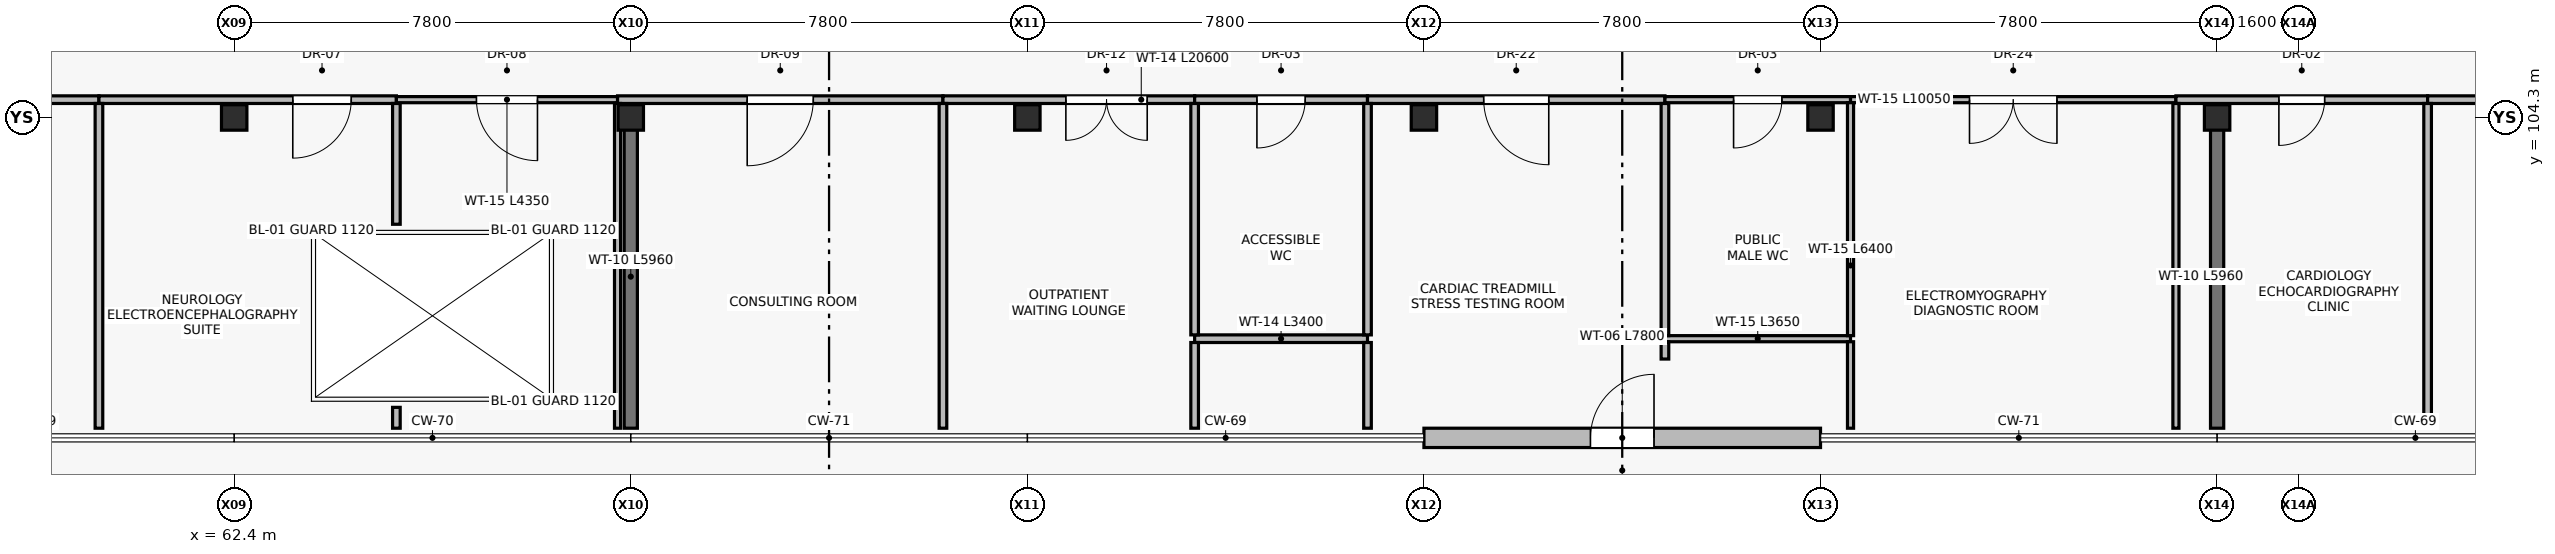
"""IFC4 building model, lengths in metres.
Left out: names, types, materials, properties, quantities, classifications, styles, units other than length and angle.
Written with IfcOpenShell. Run it as: python <this file> out.ifc"""

import sys

from ifc_helpers import new_model, si_unit, direction, frame, frame_2d, origin, origin_2d, place, context, subcontext, project, spatial, rectangle, extrude, element, fill, save


model = new_model("IFC4")
c1 = context("Model", 3, precision=1e-05, world=origin(), true_north=direction((0.0, 1.0)))
c2 = subcontext(c1, "Body", "Model", "MODEL_VIEW")
j1 = project(units=[si_unit("LENGTHUNIT", "METRE"), si_unit("PLANEANGLEUNIT", "RADIAN")], contexts=[c1])
p1 = place(None, origin())
s1 = spatial("IfcSite", under=j1, at=p1, CompositionType="ELEMENT")
p2 = place(p1, origin())
s2 = spatial("IfcBuilding", under=s1, at=p2, CompositionType="ELEMENT")
p3 = place(p2, frame((0.0, 0.0, 14.1)))
s3 = spatial("IfcBuildingStorey", under=s2, at=p3, CompositionType="ELEMENT", Elevation=14.1)
for number, where, z_axis, x_axis in (
    (1, (62.4, 104.3, 0.0), (0.0, 0.0, 1.0), (1.0, 0.0, 0.0)),
    (2, (70.2, 104.3, 0.0), (0.0, 0.0, 1.0), (1.0, 0.0, 0.0)),
    (3, (78.0, 104.3, 0.0), (0.0, 0.0, 1.0), (1.0, 0.0, 0.0)),
    (4, (85.8, 104.3, 0.0), (0.0, 0.0, 1.0), (1.0, 0.0, 0.0)),
    (5, (93.6, 104.3, 0.0), (0.0, 0.0, 1.0), (1.0, 0.0, 0.0)),
    (6, (101.4, 104.3, 0.0), (0.0, 0.0, 1.0), (1.0, 0.0, 0.0)),
):
    element("IfcColumn", number, at=place(p3, frame(where, z_axis=z_axis, x_axis=x_axis)), inside=s3, PredefinedType="COLUMN", context=c2, shape_type="SweptSolid", body=[
        extrude(rectangle(XDim=0.5, YDim=0.5, at=origin_2d()), origin(), (0.0, 0.0, 1.0), 4.5),
    ])
p4 = place(p3, frame((93.6, 98.0, 0.0), z_axis=(0.0, 0.0, 1.0), x_axis=(-1.0, 0.0, 0.0)))
e7 = element("IfcWall", 7, at=p4, inside=s3, PredefinedType="STANDARD", context=c2, shape_type="SweptSolid", body=[
    extrude(rectangle(XDim=7.8, YDim=0.38, at=frame_2d((3.9, 0.0))), origin(), (0.0, 0.0, 1.0), 4.26),
])
p5 = place(p4, frame((3.275, 0.0, 0.0)))
e8 = element("IfcOpeningElement", 8, at=p5, cuts=e7, PredefinedType="OPENING", context=c2, shape_type="SweptSolid", body=[
    extrude(rectangle(XDim=1.25, YDim=2.2, at=frame_2d((0.625, 1.1))), frame((0.0, 0.2, 0.0), z_axis=(0.0, -1.0, 0.0), x_axis=(1.0, 0.0, 0.0)), (0.0, 0.0, 1.0), 0.4),
])
for number, where, z_axis, x_axis in (
    (9, (70.2, 98.19, 0.0), (0.0, 0.0, 1.0), (0.0, 1.0, 0.0)),
    (10, (101.4, 98.19, 0.0), (0.0, 0.0, 1.0), (0.0, 1.0, 0.0)),
):
    element("IfcWall", number, at=place(p3, frame(where, z_axis=z_axis, x_axis=x_axis)), inside=s3, PredefinedType="SHEAR", context=c2, shape_type="SweptSolid", body=[
        extrude(rectangle(XDim=5.96, YDim=0.26, at=frame_2d((2.98, 0.0))), origin(), (0.0, 0.0, 1.0), 4.26),
    ])
p6 = place(p3, frame((59.74, 104.65, 0.0), z_axis=(0.0, 0.0, 1.0), x_axis=(-1.0, 0.0, 0.0)))
e11 = element("IfcWall", 11, at=p6, inside=s3, PredefinedType="PARTITIONING", context=c2, shape_type="SweptSolid", body=[
    extrude(rectangle(XDim=7.8, YDim=0.15, at=frame_2d((3.9, 0.0))), origin(), (0.0, 0.0, 1.0), 3.72),
])
p7 = place(p6, frame((3.35, 0.0, 0.0)))
e12 = element("IfcOpeningElement", 12, at=p7, cuts=e11, PredefinedType="OPENING", context=c2, shape_type="SweptSolid", body=[
    extrude(rectangle(XDim=1.1, YDim=2.15, at=frame_2d((0.55, 1.075))), frame((0.0, 0.085, 0.0), z_axis=(0.0, -1.0, 0.0), x_axis=(1.0, 0.0, 0.0)), (0.0, 0.0, 1.0), 0.17),
])
p8 = place(p3, frame((65.59, 104.65, 0.0), z_axis=(0.0, 0.0, 1.0), x_axis=(-1.0, 0.0, 0.0)))
e13 = element("IfcWall", 13, at=p8, inside=s3, PredefinedType="PARTITIONING", context=c2, shape_type="SweptSolid", body=[
    extrude(rectangle(XDim=5.85, YDim=0.15, at=frame_2d((2.925, 0.0))), origin(), (0.0, 0.0, 1.0), 3.72),
])
p9 = place(p8, frame((0.887, 0.0, 0.0)))
e14 = element("IfcOpeningElement", 14, at=p9, cuts=e13, PredefinedType="OPENING", context=c2, shape_type="SweptSolid", body=[
    extrude(rectangle(XDim=1.15, YDim=2.2, at=frame_2d((0.575, 1.1))), frame((0.0, 0.085, 0.0), z_axis=(0.0, -1.0, 0.0), x_axis=(1.0, 0.0, 0.0)), (0.0, 0.0, 1.0), 0.17),
])
p10 = place(p3, frame((69.94, 104.65, 0.0), z_axis=(0.0, 0.0, 1.0), x_axis=(-1.0, 0.0, 0.0)))
e15 = element("IfcWall", 15, at=p10, inside=s3, PredefinedType="PARTITIONING", context=c2, shape_type="SweptSolid", body=[
    extrude(rectangle(XDim=4.35, YDim=0.12, at=frame_2d((2.175, 0.0))), origin(), (0.0, 0.0, 1.0), 3.72),
])
p11 = place(p10, frame((1.575, 0.0, 0.0)))
e16 = element("IfcOpeningElement", 16, at=p11, cuts=e15, PredefinedType="OPENING", context=c2, shape_type="SweptSolid", body=[
    extrude(rectangle(XDim=1.2, YDim=2.2, at=frame_2d((0.6, 1.1))), frame((0.0, 0.07, 0.0), z_axis=(0.0, -1.0, 0.0), x_axis=(1.0, 0.0, 0.0)), (0.0, 0.0, 1.0), 0.14),
])
p12 = place(p3, frame((76.34, 104.65, 0.0), z_axis=(0.0, 0.0, 1.0), x_axis=(-1.0, 0.0, 0.0)))
e17 = element("IfcWall", 17, at=p12, inside=s3, PredefinedType="PARTITIONING", context=c2, shape_type="SweptSolid", body=[
    extrude(rectangle(XDim=6.4, YDim=0.15, at=frame_2d((3.2, 0.0))), origin(), (0.0, 0.0, 1.0), 3.72),
])
p13 = place(p12, frame((2.55, 0.0, 0.0)))
e18 = element("IfcOpeningElement", 18, at=p13, cuts=e17, PredefinedType="OPENING", context=c2, shape_type="SweptSolid", body=[
    extrude(rectangle(XDim=1.3, YDim=2.2, at=frame_2d((0.65, 1.1))), frame((0.0, 0.085, 0.0), z_axis=(0.0, -1.0, 0.0), x_axis=(1.0, 0.0, 0.0)), (0.0, 0.0, 1.0), 0.17),
])
p14 = place(p3, frame((81.29, 104.65, 0.0), z_axis=(0.0, 0.0, 1.0), x_axis=(-1.0, 0.0, 0.0)))
e19 = element("IfcWall", 19, at=p14, inside=s3, PredefinedType="PARTITIONING", context=c2, shape_type="SweptSolid", body=[
    extrude(rectangle(XDim=4.95, YDim=0.15, at=frame_2d((2.475, 0.0))), origin(), (0.0, 0.0, 1.0), 3.72),
])
p15 = place(p14, frame((0.933, 0.0, 0.0)))
e20 = element("IfcOpeningElement", 20, at=p15, cuts=e19, PredefinedType="OPENING", context=c2, shape_type="SweptSolid", body=[
    extrude(rectangle(XDim=1.6, YDim=2.2, at=frame_2d((0.8, 1.1))), frame((0.0, 0.085, 0.0), z_axis=(0.0, -1.0, 0.0), x_axis=(1.0, 0.0, 0.0)), (0.0, 0.0, 1.0), 0.17),
])
p16 = place(p3, frame((84.69, 104.65, 0.0), z_axis=(0.0, 0.0, 1.0), x_axis=(-1.0, 0.0, 0.0)))
e21 = element("IfcWall", 21, at=p16, inside=s3, PredefinedType="PARTITIONING", context=c2, shape_type="SweptSolid", body=[
    extrude(rectangle(XDim=3.4, YDim=0.15, at=frame_2d((1.7, 0.0))), origin(), (0.0, 0.0, 1.0), 3.72),
])
p17 = place(p16, frame((1.225, 0.0, 0.0)))
e22 = element("IfcOpeningElement", 22, at=p17, cuts=e21, PredefinedType="OPENING", context=c2, shape_type="SweptSolid", body=[
    extrude(rectangle(XDim=0.95, YDim=2.1, at=frame_2d((0.475, 1.05))), frame((0.0, 0.085, 0.0), z_axis=(0.0, -1.0, 0.0), x_axis=(1.0, 0.0, 0.0)), (0.0, 0.0, 1.0), 0.17),
])
p18 = place(p3, frame((81.29, 99.95, 0.0), z_axis=(0.0, 0.0, 1.0), x_axis=(1.0, 0.0, 0.0)))
e23 = element("IfcWall", 23, at=p18, inside=s3, PredefinedType="PARTITIONING", context=c2, shape_type="SweptSolid", body=[
    extrude(rectangle(XDim=3.4, YDim=0.15, at=frame_2d((1.7, 0.0))), origin(), (0.0, 0.0, 1.0), 4.26),
])
p19 = place(p3, frame((90.54, 104.65, 0.0), z_axis=(0.0, 0.0, 1.0), x_axis=(-1.0, 0.0, 0.0)))
e24 = element("IfcWall", 24, at=p19, inside=s3, PredefinedType="PARTITIONING", context=c2, shape_type="SweptSolid", body=[
    extrude(rectangle(XDim=5.85, YDim=0.15, at=frame_2d((2.925, 0.0))), origin(), (0.0, 0.0, 1.0), 3.72),
])
p20 = place(p19, frame((2.285, 0.0, 0.0)))
e25 = element("IfcOpeningElement", 25, at=p20, cuts=e24, PredefinedType="OPENING", context=c2, shape_type="SweptSolid", body=[
    extrude(rectangle(XDim=1.28, YDim=2.25, at=frame_2d((0.64, 1.125))), frame((0.0, 0.085, 0.0), z_axis=(0.0, -1.0, 0.0), x_axis=(1.0, 0.0, 0.0)), (0.0, 0.0, 1.0), 0.17),
])
p21 = place(p3, frame((94.19, 104.65, 0.0), z_axis=(0.0, 0.0, 1.0), x_axis=(-1.0, 0.0, 0.0)))
e26 = element("IfcWall", 26, at=p21, inside=s3, PredefinedType="PARTITIONING", context=c2, shape_type="SweptSolid", body=[
    extrude(rectangle(XDim=3.65, YDim=0.12, at=frame_2d((1.825, 0.0))), origin(), (0.0, 0.0, 1.0), 3.72),
])
p22 = place(p21, frame((1.35, 0.0, 0.0)))
e27 = element("IfcOpeningElement", 27, at=p22, cuts=e26, PredefinedType="OPENING", context=c2, shape_type="SweptSolid", body=[
    extrude(rectangle(XDim=0.95, YDim=2.1, at=frame_2d((0.475, 1.05))), frame((0.0, 0.07, 0.0), z_axis=(0.0, -1.0, 0.0), x_axis=(1.0, 0.0, 0.0)), (0.0, 0.0, 1.0), 0.14),
])
p23 = place(p3, frame((90.54, 99.95, 0.0), z_axis=(0.0, 0.0, 1.0), x_axis=(1.0, 0.0, 0.0)))
e28 = element("IfcWall", 28, at=p23, inside=s3, PredefinedType="PARTITIONING", context=c2, shape_type="SweptSolid", body=[
    extrude(rectangle(XDim=3.65, YDim=0.12, at=frame_2d((1.825, 0.0))), origin(), (0.0, 0.0, 1.0), 4.26),
])
p24 = place(p3, frame((100.59, 104.65, 0.0), z_axis=(0.0, 0.0, 1.0), x_axis=(-1.0, 0.0, 0.0)))
e29 = element("IfcWall", 29, at=p24, inside=s3, PredefinedType="PARTITIONING", context=c2, shape_type="SweptSolid", body=[
    extrude(rectangle(XDim=6.4, YDim=0.12, at=frame_2d((3.2, 0.0))), origin(), (0.0, 0.0, 1.0), 3.74),
])
p25 = place(p24, frame((2.34, 0.0, 0.0)))
e30 = element("IfcOpeningElement", 30, at=p25, cuts=e29, PredefinedType="OPENING", context=c2, shape_type="SweptSolid", body=[
    extrude(rectangle(XDim=1.72, YDim=2.3, at=frame_2d((0.86, 1.15))), frame((0.0, 0.07, 0.0), z_axis=(0.0, -1.0, 0.0), x_axis=(1.0, 0.0, 0.0)), (0.0, 0.0, 1.0), 0.14),
])
p26 = place(p3, frame((105.54, 104.65, 0.0), z_axis=(0.0, 0.0, 1.0), x_axis=(-1.0, 0.0, 0.0)))
e31 = element("IfcWall", 31, at=p26, inside=s3, PredefinedType="PARTITIONING", context=c2, shape_type="SweptSolid", body=[
    extrude(rectangle(XDim=4.95, YDim=0.15, at=frame_2d((2.475, 0.0))), origin(), (0.0, 0.0, 1.0), 3.74),
])
p27 = place(p26, frame((2.025, 0.0, 0.0)))
e32 = element("IfcOpeningElement", 32, at=p27, cuts=e31, PredefinedType="OPENING", context=c2, shape_type="SweptSolid", body=[
    extrude(rectangle(XDim=0.9, YDim=2.1, at=frame_2d((0.45, 1.05))), frame((0.0, 0.085, 0.0), z_axis=(0.0, -1.0, 0.0), x_axis=(1.0, 0.0, 0.0)), (0.0, 0.0, 1.0), 0.17),
])
p28 = place(p3, frame((113.34, 104.65, 0.0), z_axis=(0.0, 0.0, 1.0), x_axis=(-1.0, 0.0, 0.0)))
e33 = element("IfcWall", 33, at=p28, inside=s3, PredefinedType="PARTITIONING", context=c2, shape_type="SweptSolid", body=[
    extrude(rectangle(XDim=7.8, YDim=0.15, at=frame_2d((3.9, 0.0))), origin(), (0.0, 0.0, 1.0), 3.74),
])
p29 = place(p28, frame((2.23, 0.0, 0.0)))
e34 = element("IfcOpeningElement", 34, at=p29, cuts=e33, PredefinedType="OPENING", context=c2, shape_type="SweptSolid", body=[
    extrude(rectangle(XDim=1.0, YDim=2.1, at=frame_2d((0.5, 1.05))), frame((0.0, 0.085, 0.0), z_axis=(0.0, -1.0, 0.0), x_axis=(1.0, 0.0, 0.0)), (0.0, 0.0, 1.0), 0.17),
])
p30 = place(p3, frame((59.74, 98.19, 0.0), z_axis=(0.0, 0.0, 1.0), x_axis=(0.0, 1.0, 0.0)))
e35 = element("IfcWall", 35, at=p30, inside=s3, PredefinedType="PARTITIONING", context=c2, shape_type="SweptSolid", body=[
    extrude(rectangle(XDim=6.385, YDim=0.15, at=frame_2d((3.192, 0.0))), origin(), (0.0, 0.0, 1.0), 3.95),
])
p31 = place(p3, frame((65.59, 98.19, 0.0), z_axis=(0.0, 0.0, 1.0), x_axis=(0.0, 1.0, 0.0)))
e36 = element("IfcWall", 36, at=p31, inside=s3, PredefinedType="PARTITIONING", context=c2, shape_type="SweptSolid", body=[
    extrude(rectangle(XDim=0.41, YDim=0.15, at=frame_2d((0.205, 0.0))), origin(), (0.0, 0.0, 1.0), 4.26),
])
p32 = place(p3, frame((65.59, 102.2, 0.0), z_axis=(0.0, 0.0, 1.0), x_axis=(0.0, 1.0, 0.0)))
e37 = element("IfcWall", 37, at=p32, inside=s3, PredefinedType="PARTITIONING", context=c2, shape_type="SweptSolid", body=[
    extrude(rectangle(XDim=2.375, YDim=0.15, at=frame_2d((1.188, 0.0))), origin(), (0.0, 0.0, 1.0), 4.26),
])
p33 = place(p3, frame((69.94, 98.19, 0.0), z_axis=(0.0, 0.0, 1.0), x_axis=(0.0, 1.0, 0.0)))
e38 = element("IfcWall", 38, at=p33, inside=s3, PredefinedType="PARTITIONING", context=c2, shape_type="SweptSolid", body=[
    extrude(rectangle(XDim=6.385, YDim=0.12, at=frame_2d((3.192, 0.0))), origin(), (0.0, 0.0, 1.0), 3.77),
])
p34 = place(p3, frame((76.34, 98.19, 0.0), z_axis=(0.0, 0.0, 1.0), x_axis=(0.0, 1.0, 0.0)))
e39 = element("IfcWall", 39, at=p34, inside=s3, PredefinedType="PARTITIONING", context=c2, shape_type="SweptSolid", body=[
    extrude(rectangle(XDim=6.385, YDim=0.15, at=frame_2d((3.192, 0.0))), origin(), (0.0, 0.0, 1.0), 4.26),
])
p35 = place(p3, frame((81.29, 98.19, 0.0), z_axis=(0.0, 0.0, 1.0), x_axis=(0.0, 1.0, 0.0)))
e40 = element("IfcWall", 40, at=p35, inside=s3, PredefinedType="PARTITIONING", context=c2, shape_type="SweptSolid", body=[
    extrude(rectangle(XDim=1.685, YDim=0.15, at=frame_2d((0.843, 0.0))), origin(), (0.0, 0.0, 1.0), 4.26),
])
for number, where, z_axis, x_axis in (
    (41, (81.29, 100.025, 0.0), (0.0, 0.0, 1.0), (0.0, 1.0, 0.0)),
    (42, (84.69, 100.025, 0.0), (0.0, 0.0, 1.0), (0.0, 1.0, 0.0)),
):
    element("IfcWall", number, at=place(p3, frame(where, z_axis=z_axis, x_axis=x_axis)), inside=s3, PredefinedType="PARTITIONING", context=c2, shape_type="SweptSolid", body=[
        extrude(rectangle(XDim=4.55, YDim=0.15, at=frame_2d((2.275, 0.0))), origin(), (0.0, 0.0, 1.0), 4.26),
    ])
p36 = place(p3, frame((84.69, 98.19, 0.0), z_axis=(0.0, 0.0, 1.0), x_axis=(0.0, 1.0, 0.0)))
e43 = element("IfcWall", 43, at=p36, inside=s3, PredefinedType="PARTITIONING", context=c2, shape_type="SweptSolid", body=[
    extrude(rectangle(XDim=1.685, YDim=0.15, at=frame_2d((0.843, 0.0))), origin(), (0.0, 0.0, 1.0), 4.26),
])
p37 = place(p3, frame((90.54, 99.55, 0.0), z_axis=(0.0, 0.0, 1.0), x_axis=(0.0, 1.0, 0.0)))
e44 = element("IfcWall", 44, at=p37, inside=s3, PredefinedType="PARTITIONING", context=c2, shape_type="SweptSolid", body=[
    extrude(rectangle(XDim=0.34, YDim=0.15, at=frame_2d((0.17, 0.0))), origin(), (0.0, 0.0, 1.0), 4.26),
])
p38 = place(p3, frame((90.54, 100.01, 0.0), z_axis=(0.0, 0.0, 1.0), x_axis=(0.0, 1.0, 0.0)))
e45 = element("IfcWall", 45, at=p38, inside=s3, PredefinedType="PARTITIONING", context=c2, shape_type="SweptSolid", body=[
    extrude(rectangle(XDim=4.565, YDim=0.15, at=frame_2d((2.282, 0.0))), origin(), (0.0, 0.0, 1.0), 4.26),
])
p39 = place(p3, frame((94.19, 100.01, 0.0), z_axis=(0.0, 0.0, 1.0), x_axis=(0.0, 1.0, 0.0)))
e46 = element("IfcWall", 46, at=p39, inside=s3, PredefinedType="PARTITIONING", context=c2, shape_type="SweptSolid", body=[
    extrude(rectangle(XDim=4.58, YDim=0.12, at=frame_2d((2.29, 0.0))), origin(), (0.0, 0.0, 1.0), 4.26),
])
p40 = place(p3, frame((94.19, 98.19, 0.0), z_axis=(0.0, 0.0, 1.0), x_axis=(0.0, 1.0, 0.0)))
e47 = element("IfcWall", 47, at=p40, inside=s3, PredefinedType="PARTITIONING", context=c2, shape_type="SweptSolid", body=[
    extrude(rectangle(XDim=1.7, YDim=0.12, at=frame_2d((0.85, 0.0))), origin(), (0.0, 0.0, 1.0), 4.26),
])
p41 = place(p3, frame((100.59, 98.19, 0.0), z_axis=(0.0, 0.0, 1.0), x_axis=(0.0, 1.0, 0.0)))
e48 = element("IfcWall", 48, at=p41, inside=s3, PredefinedType="PARTITIONING", context=c2, shape_type="SweptSolid", body=[
    extrude(rectangle(XDim=6.385, YDim=0.12, at=frame_2d((3.192, 0.0))), origin(), (0.0, 0.0, 1.0), 4.26),
])
p42 = place(p3, frame((105.54, 98.19, 0.0), z_axis=(0.0, 0.0, 1.0), x_axis=(0.0, 1.0, 0.0)))
e49 = element("IfcWall", 49, at=p42, inside=s3, PredefinedType="PARTITIONING", context=c2, shape_type="SweptSolid", body=[
    extrude(rectangle(XDim=6.385, YDim=0.15, at=frame_2d((3.192, 0.0))), origin(), (0.0, 0.0, 1.0), 4.26),
])
p43 = place(p5, frame((1.25, 0.0, 0.0), z_axis=(0.0, 0.0, 1.0), x_axis=(-1.0, 0.0, 0.0)))
e50 = element("IfcDoor", 50, at=p43, inside=s3, OperationType="SINGLE_SWING_LEFT", PredefinedType="DOOR", context=c2, shape_type="SweptSolid", body=[
    extrude(rectangle(XDim=1.25, YDim=2.2, at=frame_2d((0.625, 1.1))), frame((0.0, 0.025, 0.0), z_axis=(0.0, -1.0, 0.0), x_axis=(1.0, 0.0, 0.0)), (0.0, 0.0, 1.0), 0.05),
])
fill(e8, e50)
p44 = place(p9, origin())
e51 = element("IfcDoor", 51, at=p44, inside=s3, OperationType="SINGLE_SWING_RIGHT", PredefinedType="DOOR", context=c2, shape_type="SweptSolid", body=[
    extrude(rectangle(XDim=1.15, YDim=2.2, at=frame_2d((0.575, 1.1))), frame((0.0, 0.025, 0.0), z_axis=(0.0, -1.0, 0.0), x_axis=(1.0, 0.0, 0.0)), (0.0, 0.0, 1.0), 0.05),
])
fill(e14, e51)
p45 = place(p11, origin())
e52 = element("IfcDoor", 52, at=p45, inside=s3, OperationType="SINGLE_SWING_LEFT", PredefinedType="DOOR", context=c2, shape_type="SweptSolid", body=[
    extrude(rectangle(XDim=1.2, YDim=2.2, at=frame_2d((0.6, 1.1))), frame((0.0, 0.025, 0.0), z_axis=(0.0, -1.0, 0.0), x_axis=(1.0, 0.0, 0.0)), (0.0, 0.0, 1.0), 0.05),
])
fill(e16, e52)
p46 = place(p13, origin())
e53 = element("IfcDoor", 53, at=p46, inside=s3, OperationType="SINGLE_SWING_RIGHT", PredefinedType="DOOR", context=c2, shape_type="SweptSolid", body=[
    extrude(rectangle(XDim=1.3, YDim=2.2, at=frame_2d((0.65, 1.1))), frame((0.0, 0.025, 0.0), z_axis=(0.0, -1.0, 0.0), x_axis=(1.0, 0.0, 0.0)), (0.0, 0.0, 1.0), 0.05),
])
fill(e18, e53)
p47 = place(p15, origin())
e54 = element("IfcDoor", 54, at=p47, inside=s3, OperationType="DOUBLE_DOOR_SINGLE_SWING", PredefinedType="DOOR", context=c2, shape_type="SweptSolid", body=[
    extrude(rectangle(XDim=1.6, YDim=2.2, at=frame_2d((0.8, 1.1))), frame((0.0, 0.025, 0.0), z_axis=(0.0, -1.0, 0.0), x_axis=(1.0, 0.0, 0.0)), (0.0, 0.0, 1.0), 0.05),
])
fill(e20, e54)
p48 = place(p17, origin())
e55 = element("IfcDoor", 55, at=p48, inside=s3, OperationType="SINGLE_SWING_RIGHT", PredefinedType="DOOR", context=c2, shape_type="SweptSolid", body=[
    extrude(rectangle(XDim=0.95, YDim=2.1, at=frame_2d((0.475, 1.05))), frame((0.0, 0.025, 0.0), z_axis=(0.0, -1.0, 0.0), x_axis=(1.0, 0.0, 0.0)), (0.0, 0.0, 1.0), 0.05),
])
fill(e22, e55)
p49 = place(p20, origin())
e56 = element("IfcDoor", 56, at=p49, inside=s3, OperationType="SINGLE_SWING_LEFT", PredefinedType="DOOR", context=c2, shape_type="SweptSolid", body=[
    extrude(rectangle(XDim=1.28, YDim=2.25, at=frame_2d((0.64, 1.125))), frame((0.0, 0.025, 0.0), z_axis=(0.0, -1.0, 0.0), x_axis=(1.0, 0.0, 0.0)), (0.0, 0.0, 1.0), 0.05),
])
fill(e25, e56)
p50 = place(p22, origin())
e57 = element("IfcDoor", 57, at=p50, inside=s3, OperationType="SINGLE_SWING_RIGHT", PredefinedType="DOOR", context=c2, shape_type="SweptSolid", body=[
    extrude(rectangle(XDim=0.95, YDim=2.1, at=frame_2d((0.475, 1.05))), frame((0.0, 0.025, 0.0), z_axis=(0.0, -1.0, 0.0), x_axis=(1.0, 0.0, 0.0)), (0.0, 0.0, 1.0), 0.05),
])
fill(e27, e57)
p51 = place(p25, origin())
e58 = element("IfcDoor", 58, at=p51, inside=s3, OperationType="DOUBLE_DOOR_SINGLE_SWING", PredefinedType="DOOR", context=c2, shape_type="SweptSolid", body=[
    extrude(rectangle(XDim=1.72, YDim=2.3, at=frame_2d((0.86, 1.15))), frame((0.0, 0.025, 0.0), z_axis=(0.0, -1.0, 0.0), x_axis=(1.0, 0.0, 0.0)), (0.0, 0.0, 1.0), 0.05),
])
fill(e30, e58)
p52 = place(p27, origin())
e59 = element("IfcDoor", 59, at=p52, inside=s3, OperationType="SINGLE_SWING_RIGHT", PredefinedType="DOOR", context=c2, shape_type="SweptSolid", body=[
    extrude(rectangle(XDim=0.9, YDim=2.1, at=frame_2d((0.45, 1.05))), frame((0.0, 0.025, 0.0), z_axis=(0.0, -1.0, 0.0), x_axis=(1.0, 0.0, 0.0)), (0.0, 0.0, 1.0), 0.05),
])
fill(e32, e59)
save(model, sys.argv[1])
